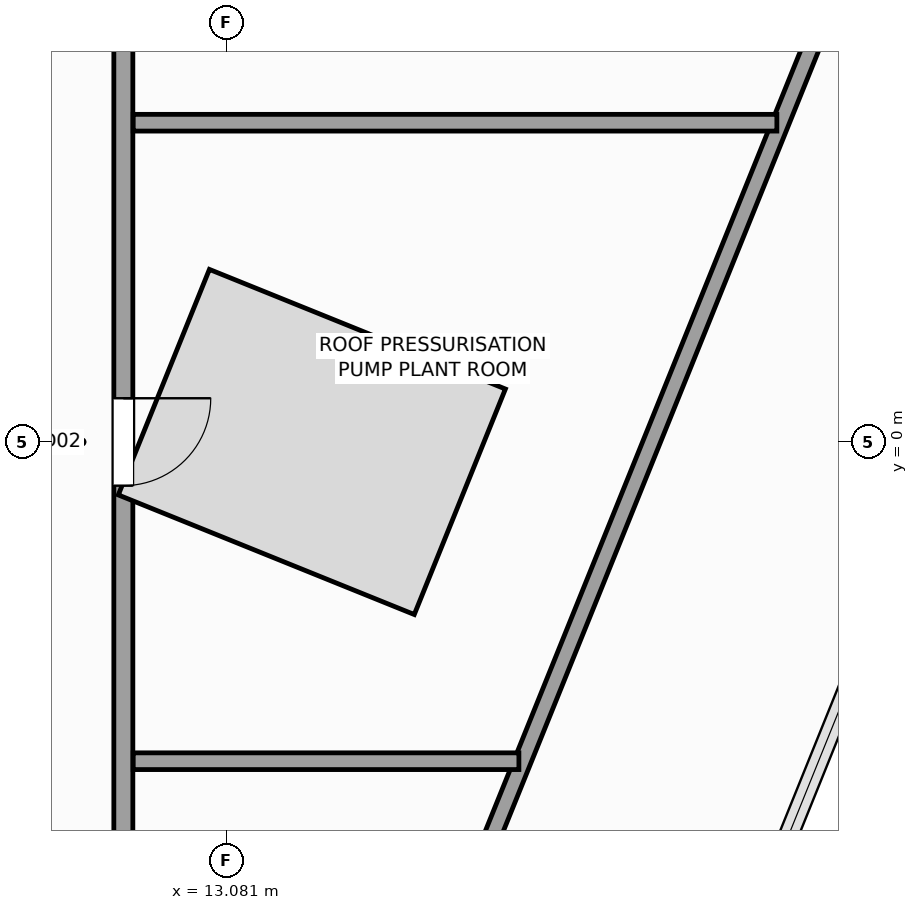
"""IFC4 building model, lengths in metres.
Left out: names, types, materials, properties, quantities, classifications, styles, units other than length and angle.
Written with IfcOpenShell. Run it as: python <this file> out.ifc"""

import sys

from ifc_helpers import new_model, si_unit, direction, frame, frame_2d, origin, place, context, subcontext, project, spatial, rectangle, extrude, source, transform, mapped, element, fill, save


model = new_model("IFC4")
c1 = context("Model", 3, precision=1e-05, world=origin(), true_north=direction((0.0, 1.0)))
c2 = subcontext(c1, "Body", "Model", "MODEL_VIEW")
j1 = project(units=[si_unit("LENGTHUNIT", "METRE"), si_unit("PLANEANGLEUNIT", "RADIAN")], contexts=[c1])
p1 = place(None, origin())
s1 = spatial("IfcSite", under=j1, at=p1, CompositionType="ELEMENT")
p2 = place(p1, origin())
s2 = spatial("IfcBuilding", under=s1, at=p2, CompositionType="ELEMENT")
p3 = place(p2, frame((0.0, 0.0, 337.6)))
s3 = spatial("IfcBuildingStorey", under=s2, at=p3, CompositionType="ELEMENT", Elevation=337.6)
p4 = place(p3, frame((11.172, -18.556, 0.0), z_axis=(0.0, 0.0, 1.0), x_axis=(0.374611707018, 0.927181788521, 0.0)))
e1 = element("IfcWall", 1, at=p4, inside=s3, PredefinedType="PARTITIONING", context=c2, shape_type="SweptSolid", body=[
    extrude(rectangle(XDim=26.04, YDim=0.22, at=frame_2d((13.02, 0.0))), origin(), (0.0, 0.0, 1.0), 3.05),
])
p5 = place(p3, frame((11.72, -11.62, 0.0), z_axis=(0.0, 0.0, 1.0), x_axis=(0.0, 1.0, 0.0)))
e2 = element("IfcWall", 2, at=p5, inside=s3, PredefinedType="PARTITIONING", context=c2, shape_type="SweptSolid", body=[
    extrude(rectangle(XDim=21.84, YDim=0.25, at=frame_2d((10.92, 0.0))), origin(), (0.0, 0.0, 1.0), 3.7),
])
p6 = place(p5, frame((11.045, 0.0, 0.0)))
e3 = element("IfcOpeningElement", 3, at=p6, cuts=e2, PredefinedType="OPENING", context=c2, shape_type="SweptSolid", body=[
    extrude(rectangle(XDim=1.15, YDim=2.25, at=frame_2d((0.575, 1.125))), frame((0.0, 0.135, 0.0), z_axis=(0.0, -1.0, 0.0), x_axis=(1.0, 0.0, 0.0)), (0.0, 0.0, 1.0), 0.27),
])
p7 = place(p3, frame((11.85, 4.2, 0.0), z_axis=(0.0, 0.0, 1.0), x_axis=(1.0, 0.0, 0.0)))
e4 = element("IfcWall", 4, at=p7, inside=s3, PredefinedType="PARTITIONING", context=c2, shape_type="SweptSolid", body=[
    extrude(rectangle(XDim=8.468, YDim=0.22, at=frame_2d((4.234, 0.0))), origin(), (0.0, 0.0, 1.0), 3.7),
])
p8 = place(p3, frame((11.85, -4.2, 0.0), z_axis=(0.0, 0.0, 1.0), x_axis=(1.0, 0.0, 0.0)))
e5 = element("IfcWall", 5, at=p8, inside=s3, PredefinedType="PARTITIONING", context=c2, shape_type="SweptSolid", body=[
    extrude(rectangle(XDim=5.074, YDim=0.22, at=frame_2d((2.537, 0.0))), origin(), (0.0, 0.0, 1.0), 3.7),
])
m1 = source(origin(), c2, "Body", "SweptSolid", [
    extrude(rectangle(XDim=1.15, YDim=2.25, at=frame_2d((0.575, 1.125))), frame((0.0, 0.025, 0.0), z_axis=(0.0, -1.0, 0.0), x_axis=(1.0, 0.0, 0.0)), (0.0, 0.0, 1.0), 0.05),
])
p9 = place(p6, frame((1.15, 0.0, 0.0), z_axis=(0.0, 0.0, 1.0), x_axis=(-1.0, 0.0, 0.0)))
e6 = element("IfcDoor", 6, at=p9, inside=s3, OperationType="SINGLE_SWING_RIGHT", PredefinedType="DOOR", context=c2, shape_type="MappedRepresentation", body=[
    mapped(m1, transform((0.0, 0.0, 0.0), scale=1.0)),
])
fill(e3, e6)
save(model, sys.argv[1])
